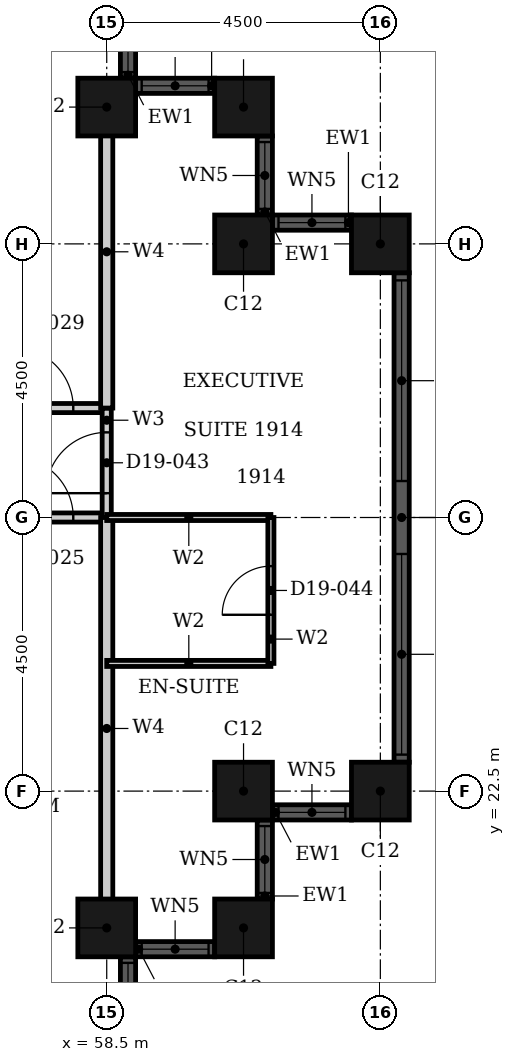
"""IFC4 building model, lengths in metres.
Left out: names, types, materials, properties, quantities, classifications, styles, units other than length and angle.
Written with IfcOpenShell. Run it as: python <this file> out.ifc"""

import sys

from ifc_helpers import new_model, si_unit, direction, frame, frame_2d, origin, origin_2d, place, context, subcontext, project, spatial, rectangle, hollow_rectangle, extrude, element, fill, save


model = new_model("IFC4")
c1 = context("Model", 3, precision=1e-05, world=origin(), true_north=direction((0.0, 1.0)))
c2 = subcontext(c1, "Body", "Model", "MODEL_VIEW")
j1 = project(units=[si_unit("LENGTHUNIT", "METRE"), si_unit("PLANEANGLEUNIT", "RADIAN")], contexts=[c1])
p1 = place(None, origin())
s1 = spatial("IfcSite", under=j1, at=p1, CompositionType="ELEMENT")
p2 = place(p1, origin())
s2 = spatial("IfcBuilding", under=s1, at=p2, CompositionType="ELEMENT")
p3 = place(p2, frame((0.0, 0.0, 81.6)))
s3 = spatial("IfcBuildingStorey", under=s2, at=p3, CompositionType="ELEMENT", Elevation=81.6)
for number, where, z_axis, x_axis in (
    (1, (58.5, 20.25, 0.0), (0.0, 0.0, 1.0), (1.0, 0.0, 0.0)),
    (2, (60.75, 20.25, 0.0), (0.0, 0.0, 1.0), (1.0, 0.0, 0.0)),
    (3, (60.75, 22.5, 0.0), (0.0, 0.0, 1.0), (1.0, 0.0, 0.0)),
    (4, (63.0, 22.5, 0.0), (0.0, 0.0, 1.0), (1.0, 0.0, 0.0)),
    (5, (63.0, 31.5, 0.0), (0.0, 0.0, 1.0), (1.0, 0.0, 0.0)),
    (6, (60.75, 31.5, 0.0), (0.0, 0.0, 1.0), (1.0, 0.0, 0.0)),
    (7, (60.75, 33.75, 0.0), (0.0, 0.0, 1.0), (1.0, 0.0, 0.0)),
    (8, (58.5, 33.75, 0.0), (0.0, 0.0, 1.0), (1.0, 0.0, 0.0)),
):
    element("IfcColumn", number, at=place(p3, frame(where, z_axis=z_axis, x_axis=x_axis)), inside=s3, PredefinedType="COLUMN", context=c2, shape_type="SweptSolid", body=[
        extrude(hollow_rectangle(XDim=0.95, YDim=0.95, WallThickness=0.03, at=origin_2d()), origin(), (0.0, 0.0, 1.0), 3.6),
    ])
p4 = place(p3, frame((58.85, 18.475, 0.0), z_axis=(0.0, 0.0, 1.0), x_axis=(0.0, 1.0, 0.0)))
e9 = element("IfcWall", 9, at=p4, inside=s3, PredefinedType="SOLIDWALL", context=c2, shape_type="SweptSolid", body=[
    extrude(rectangle(XDim=1.3, YDim=0.25, at=frame_2d((0.65, 0.0))), origin(), (0.0, 0.0, 1.0), 3.6),
])
p5 = place(p4, frame((0.1, 0.0, 0.9)))
e10 = element("IfcOpeningElement", 10, at=p5, cuts=e9, PredefinedType="OPENING", context=c2, shape_type="SweptSolid", body=[
    extrude(rectangle(XDim=1.1, YDim=2.08, at=frame_2d((0.55, 1.04))), frame((0.0, 0.135, 0.0), z_axis=(0.0, -1.0, 0.0), x_axis=(1.0, 0.0, 0.0)), (0.0, 0.0, 1.0), 0.27),
])
p6 = place(p3, frame((58.975, 19.9, 0.0), z_axis=(0.0, 0.0, 1.0), x_axis=(1.0, 0.0, 0.0)))
e11 = element("IfcWall", 11, at=p6, inside=s3, PredefinedType="SOLIDWALL", context=c2, shape_type="SweptSolid", body=[
    extrude(rectangle(XDim=1.3, YDim=0.25, at=frame_2d((0.65, 0.0))), origin(), (0.0, 0.0, 1.0), 3.6),
])
p7 = place(p6, frame((0.1, 0.0, 0.9)))
e12 = element("IfcOpeningElement", 12, at=p7, cuts=e11, PredefinedType="OPENING", context=c2, shape_type="SweptSolid", body=[
    extrude(rectangle(XDim=1.1, YDim=2.08, at=frame_2d((0.55, 1.04))), frame((0.0, 0.135, 0.0), z_axis=(0.0, -1.0, 0.0), x_axis=(1.0, 0.0, 0.0)), (0.0, 0.0, 1.0), 0.27),
])
p8 = place(p3, frame((61.1, 20.725, 0.0), z_axis=(0.0, 0.0, 1.0), x_axis=(0.0, 1.0, 0.0)))
e13 = element("IfcWall", 13, at=p8, inside=s3, PredefinedType="SOLIDWALL", context=c2, shape_type="SweptSolid", body=[
    extrude(rectangle(XDim=1.3, YDim=0.25, at=frame_2d((0.65, 0.0))), origin(), (0.0, 0.0, 1.0), 3.6),
])
p9 = place(p8, frame((0.1, 0.0, 0.9)))
e14 = element("IfcOpeningElement", 14, at=p9, cuts=e13, PredefinedType="OPENING", context=c2, shape_type="SweptSolid", body=[
    extrude(rectangle(XDim=1.1, YDim=2.08, at=frame_2d((0.55, 1.04))), frame((0.0, 0.135, 0.0), z_axis=(0.0, -1.0, 0.0), x_axis=(1.0, 0.0, 0.0)), (0.0, 0.0, 1.0), 0.27),
])
p10 = place(p3, frame((61.225, 22.15, 0.0), z_axis=(0.0, 0.0, 1.0), x_axis=(1.0, 0.0, 0.0)))
e15 = element("IfcWall", 15, at=p10, inside=s3, PredefinedType="SOLIDWALL", context=c2, shape_type="SweptSolid", body=[
    extrude(rectangle(XDim=1.3, YDim=0.25, at=frame_2d((0.65, 0.0))), origin(), (0.0, 0.0, 1.0), 3.6),
])
p11 = place(p10, frame((0.1, 0.0, 0.9)))
e16 = element("IfcOpeningElement", 16, at=p11, cuts=e15, PredefinedType="OPENING", context=c2, shape_type="SweptSolid", body=[
    extrude(rectangle(XDim=1.1, YDim=2.08, at=frame_2d((0.55, 1.04))), frame((0.0, 0.135, 0.0), z_axis=(0.0, -1.0, 0.0), x_axis=(1.0, 0.0, 0.0)), (0.0, 0.0, 1.0), 0.27),
])
p12 = place(p3, frame((63.35, 22.975, 0.0), z_axis=(0.0, 0.0, 1.0), x_axis=(0.0, 1.0, 0.0)))
e17 = element("IfcWall", 17, at=p12, inside=s3, PredefinedType="SOLIDWALL", context=c2, shape_type="SweptSolid", body=[
    extrude(rectangle(XDim=8.05, YDim=0.25, at=frame_2d((4.025, 0.0))), origin(), (0.0, 0.0, 1.0), 3.6),
])
p13 = place(p12, frame((0.125, 0.0, 0.9)))
e18 = element("IfcOpeningElement", 18, at=p13, cuts=e17, PredefinedType="OPENING", context=c2, shape_type="SweptSolid", body=[
    extrude(rectangle(XDim=3.3, YDim=2.08, at=frame_2d((1.65, 1.04))), frame((0.0, 0.135, 0.0), z_axis=(0.0, -1.0, 0.0), x_axis=(1.0, 0.0, 0.0)), (0.0, 0.0, 1.0), 0.27),
])
p14 = place(p12, frame((4.625, 0.0, 0.9)))
e19 = element("IfcOpeningElement", 19, at=p14, cuts=e17, PredefinedType="OPENING", context=c2, shape_type="SweptSolid", body=[
    extrude(rectangle(XDim=3.3, YDim=2.08, at=frame_2d((1.65, 1.04))), frame((0.0, 0.135, 0.0), z_axis=(0.0, -1.0, 0.0), x_axis=(1.0, 0.0, 0.0)), (0.0, 0.0, 1.0), 0.27),
])
p15 = place(p3, frame((62.525, 31.85, 0.0), z_axis=(0.0, 0.0, 1.0), x_axis=(-1.0, 0.0, 0.0)))
e20 = element("IfcWall", 20, at=p15, inside=s3, PredefinedType="SOLIDWALL", context=c2, shape_type="SweptSolid", body=[
    extrude(rectangle(XDim=1.3, YDim=0.25, at=frame_2d((0.65, 0.0))), origin(), (0.0, 0.0, 1.0), 3.6),
])
p16 = place(p15, frame((0.1, 0.0, 0.9)))
e21 = element("IfcOpeningElement", 21, at=p16, cuts=e20, PredefinedType="OPENING", context=c2, shape_type="SweptSolid", body=[
    extrude(rectangle(XDim=1.1, YDim=2.08, at=frame_2d((0.55, 1.04))), frame((0.0, 0.135, 0.0), z_axis=(0.0, -1.0, 0.0), x_axis=(1.0, 0.0, 0.0)), (0.0, 0.0, 1.0), 0.27),
])
p17 = place(p3, frame((61.1, 31.975, 0.0), z_axis=(0.0, 0.0, 1.0), x_axis=(0.0, 1.0, 0.0)))
e22 = element("IfcWall", 22, at=p17, inside=s3, PredefinedType="SOLIDWALL", context=c2, shape_type="SweptSolid", body=[
    extrude(rectangle(XDim=1.3, YDim=0.25, at=frame_2d((0.65, 0.0))), origin(), (0.0, 0.0, 1.0), 3.6),
])
p18 = place(p17, frame((0.1, 0.0, 0.9)))
e23 = element("IfcOpeningElement", 23, at=p18, cuts=e22, PredefinedType="OPENING", context=c2, shape_type="SweptSolid", body=[
    extrude(rectangle(XDim=1.1, YDim=2.08, at=frame_2d((0.55, 1.04))), frame((0.0, 0.135, 0.0), z_axis=(0.0, -1.0, 0.0), x_axis=(1.0, 0.0, 0.0)), (0.0, 0.0, 1.0), 0.27),
])
p19 = place(p3, frame((60.275, 34.1, 0.0), z_axis=(0.0, 0.0, 1.0), x_axis=(-1.0, 0.0, 0.0)))
e24 = element("IfcWall", 24, at=p19, inside=s3, PredefinedType="SOLIDWALL", context=c2, shape_type="SweptSolid", body=[
    extrude(rectangle(XDim=1.3, YDim=0.25, at=frame_2d((0.65, 0.0))), origin(), (0.0, 0.0, 1.0), 3.6),
])
p20 = place(p19, frame((0.1, 0.0, 0.9)))
e25 = element("IfcOpeningElement", 25, at=p20, cuts=e24, PredefinedType="OPENING", context=c2, shape_type="SweptSolid", body=[
    extrude(rectangle(XDim=1.1, YDim=2.08, at=frame_2d((0.55, 1.04))), frame((0.0, 0.135, 0.0), z_axis=(0.0, -1.0, 0.0), x_axis=(1.0, 0.0, 0.0)), (0.0, 0.0, 1.0), 0.27),
])
p21 = place(p3, frame((58.85, 34.225, 0.0), z_axis=(0.0, 0.0, 1.0), x_axis=(0.0, 1.0, 0.0)))
e26 = element("IfcWall", 26, at=p21, inside=s3, PredefinedType="SOLIDWALL", context=c2, shape_type="SweptSolid", body=[
    extrude(rectangle(XDim=1.3, YDim=0.25, at=frame_2d((0.65, 0.0))), origin(), (0.0, 0.0, 1.0), 3.6),
])
p22 = place(p21, frame((0.1, 0.0, 0.9)))
e27 = element("IfcOpeningElement", 27, at=p22, cuts=e26, PredefinedType="OPENING", context=c2, shape_type="SweptSolid", body=[
    extrude(rectangle(XDim=1.1, YDim=2.08, at=frame_2d((0.55, 1.04))), frame((0.0, 0.135, 0.0), z_axis=(0.0, -1.0, 0.0), x_axis=(1.0, 0.0, 0.0)), (0.0, 0.0, 1.0), 0.27),
])
p23 = place(p3, frame((46.8, 27.0, 0.0), z_axis=(0.0, 0.0, 1.0), x_axis=(1.0, 0.0, 0.0)))
e28 = element("IfcWall", 28, at=p23, inside=s3, PredefinedType="PARTITIONING", context=c2, shape_type="SweptSolid", body=[
    extrude(rectangle(XDim=11.7, YDim=0.15, at=frame_2d((5.85, 0.0))), origin(), (0.0, 0.0, 1.0), 2.58),
])
p24 = place(p23, frame((5.65, 0.0, 0.0)))
e29 = element("IfcOpeningElement", 29, at=p24, cuts=e28, PredefinedType="OPENING", context=c2, shape_type="SweptSolid", body=[
    extrude(rectangle(XDim=1.0, YDim=2.1, at=frame_2d((0.5, 1.05))), frame((0.0, 0.085, 0.0), z_axis=(0.0, -1.0, 0.0), x_axis=(1.0, 0.0, 0.0)), (0.0, 0.0, 1.0), 0.17),
])
p25 = place(p23, frame((10.15, 0.0, 0.0)))
e30 = element("IfcOpeningElement", 30, at=p25, cuts=e28, PredefinedType="OPENING", context=c2, shape_type="SweptSolid", body=[
    extrude(rectangle(XDim=1.0, YDim=2.1, at=frame_2d((0.5, 1.05))), frame((0.0, 0.085, 0.0), z_axis=(0.0, -1.0, 0.0), x_axis=(1.0, 0.0, 0.0)), (0.0, 0.0, 1.0), 0.17),
])
p26 = place(p3, frame((46.8, 28.8, 0.0), z_axis=(0.0, 0.0, 1.0), x_axis=(1.0, 0.0, 0.0)))
e31 = element("IfcWall", 31, at=p26, inside=s3, PredefinedType="PARTITIONING", context=c2, shape_type="SweptSolid", body=[
    extrude(rectangle(XDim=11.7, YDim=0.15, at=frame_2d((5.85, 0.0))), origin(), (0.0, 0.0, 1.0), 3.3),
])
p27 = place(p26, frame((5.65, 0.0, 0.0)))
e32 = element("IfcOpeningElement", 32, at=p27, cuts=e31, PredefinedType="OPENING", context=c2, shape_type="SweptSolid", body=[
    extrude(rectangle(XDim=1.0, YDim=2.1, at=frame_2d((0.5, 1.05))), frame((0.0, 0.085, 0.0), z_axis=(0.0, -1.0, 0.0), x_axis=(1.0, 0.0, 0.0)), (0.0, 0.0, 1.0), 0.17),
])
p28 = place(p26, frame((10.15, 0.0, 0.0)))
e33 = element("IfcOpeningElement", 33, at=p28, cuts=e31, PredefinedType="OPENING", context=c2, shape_type="SweptSolid", body=[
    extrude(rectangle(XDim=1.0, YDim=2.1, at=frame_2d((0.5, 1.05))), frame((0.0, 0.085, 0.0), z_axis=(0.0, -1.0, 0.0), x_axis=(1.0, 0.0, 0.0)), (0.0, 0.0, 1.0), 0.17),
])
p29 = place(p3, frame((58.5, 27.0, 0.0), z_axis=(0.0, 0.0, 1.0), x_axis=(0.0, 1.0, 0.0)))
e34 = element("IfcWall", 34, at=p29, inside=s3, PredefinedType="PARTITIONING", context=c2, shape_type="SweptSolid", body=[
    extrude(rectangle(XDim=1.8, YDim=0.15, at=frame_2d((0.9, 0.0))), origin(), (0.0, 0.0, 1.0), 3.3),
])
p30 = place(p29, frame((0.4, 0.0, 0.0)))
e35 = element("IfcOpeningElement", 35, at=p30, cuts=e34, PredefinedType="OPENING", context=c2, shape_type="SweptSolid", body=[
    extrude(rectangle(XDim=1.0, YDim=2.1, at=frame_2d((0.5, 1.05))), frame((0.0, 0.085, 0.0), z_axis=(0.0, -1.0, 0.0), x_axis=(1.0, 0.0, 0.0)), (0.0, 0.0, 1.0), 0.17),
])
p31 = place(p3, frame((58.5, 28.8, 0.0), z_axis=(0.0, 0.0, 1.0), x_axis=(0.0, 1.0, 0.0)))
e36 = element("IfcWall", 36, at=p31, inside=s3, PredefinedType="PARTITIONING", context=c2, shape_type="SweptSolid", body=[
    extrude(rectangle(XDim=5.14, YDim=0.2, at=frame_2d((2.57, 0.0))), origin(), (0.0, 0.0, 1.0), 3.3),
])
p32 = place(p3, frame((58.5, 20.06, 0.0), z_axis=(0.0, 0.0, 1.0), x_axis=(0.0, 1.0, 0.0)))
e37 = element("IfcWall", 37, at=p32, inside=s3, PredefinedType="PARTITIONING", context=c2, shape_type="SweptSolid", body=[
    extrude(rectangle(XDim=6.94, YDim=0.2, at=frame_2d((3.47, 0.0))), origin(), (0.0, 0.0, 1.0), 3.3),
])
p33 = place(p3, frame((58.5, 24.6, 0.0), z_axis=(0.0, 0.0, 1.0), x_axis=(1.0, 0.0, 0.0)))
e38 = element("IfcWall", 38, at=p33, inside=s3, PredefinedType="PARTITIONING", context=c2, shape_type="SweptSolid", body=[
    extrude(rectangle(XDim=2.7, YDim=0.1, at=frame_2d((1.35, 0.0))), origin(), (0.0, 0.0, 1.0), 3.3),
])
p34 = place(p3, frame((58.5, 27.0, 0.0), z_axis=(0.0, 0.0, 1.0), x_axis=(1.0, 0.0, 0.0)))
e39 = element("IfcWall", 39, at=p34, inside=s3, PredefinedType="PARTITIONING", context=c2, shape_type="SweptSolid", body=[
    extrude(rectangle(XDim=2.7, YDim=0.1, at=frame_2d((1.35, 0.0))), origin(), (0.0, 0.0, 1.0), 2.58),
])
p35 = place(p3, frame((61.2, 24.6, 0.0), z_axis=(0.0, 0.0, 1.0), x_axis=(0.0, 1.0, 0.0)))
e40 = element("IfcWall", 40, at=p35, inside=s3, PredefinedType="PARTITIONING", context=c2, shape_type="SweptSolid", body=[
    extrude(rectangle(XDim=2.4, YDim=0.1, at=frame_2d((1.2, 0.0))), origin(), (0.0, 0.0, 1.0), 3.3),
])
p36 = place(p35, frame((0.8, 0.0, 0.0)))
e41 = element("IfcOpeningElement", 41, at=p36, cuts=e40, PredefinedType="OPENING", context=c2, shape_type="SweptSolid", body=[
    extrude(rectangle(XDim=0.8, YDim=2.1, at=frame_2d((0.4, 1.05))), frame((0.0, 0.06, 0.0), z_axis=(0.0, -1.0, 0.0), x_axis=(1.0, 0.0, 0.0)), (0.0, 0.0, 1.0), 0.12),
])
p37 = place(p5, origin())
e42 = element("IfcWindow", 42, at=p37, inside=s3, PartitioningType="SINGLE_PANEL", PredefinedType="WINDOW", context=c2, shape_type="SweptSolid", body=[
    extrude(rectangle(XDim=1.1, YDim=2.08, at=frame_2d((0.55, 1.04))), frame((0.0, 0.03, 0.0), z_axis=(0.0, -1.0, 0.0), x_axis=(1.0, 0.0, 0.0)), (0.0, 0.0, 1.0), 0.06),
])
fill(e10, e42)
p38 = place(p7, origin())
e43 = element("IfcWindow", 43, at=p38, inside=s3, PartitioningType="SINGLE_PANEL", PredefinedType="WINDOW", context=c2, shape_type="SweptSolid", body=[
    extrude(rectangle(XDim=1.1, YDim=2.08, at=frame_2d((0.55, 1.04))), frame((0.0, 0.03, 0.0), z_axis=(0.0, -1.0, 0.0), x_axis=(1.0, 0.0, 0.0)), (0.0, 0.0, 1.0), 0.06),
])
fill(e12, e43)
p39 = place(p9, origin())
e44 = element("IfcWindow", 44, at=p39, inside=s3, PartitioningType="SINGLE_PANEL", PredefinedType="WINDOW", context=c2, shape_type="SweptSolid", body=[
    extrude(rectangle(XDim=1.1, YDim=2.08, at=frame_2d((0.55, 1.04))), frame((0.0, 0.03, 0.0), z_axis=(0.0, -1.0, 0.0), x_axis=(1.0, 0.0, 0.0)), (0.0, 0.0, 1.0), 0.06),
])
fill(e14, e44)
p40 = place(p11, origin())
e45 = element("IfcWindow", 45, at=p40, inside=s3, PartitioningType="SINGLE_PANEL", PredefinedType="WINDOW", context=c2, shape_type="SweptSolid", body=[
    extrude(rectangle(XDim=1.1, YDim=2.08, at=frame_2d((0.55, 1.04))), frame((0.0, 0.03, 0.0), z_axis=(0.0, -1.0, 0.0), x_axis=(1.0, 0.0, 0.0)), (0.0, 0.0, 1.0), 0.06),
])
fill(e16, e45)
p41 = place(p13, origin())
e46 = element("IfcWindow", 46, at=p41, inside=s3, PartitioningType="SINGLE_PANEL", PredefinedType="WINDOW", context=c2, shape_type="SweptSolid", body=[
    extrude(rectangle(XDim=3.3, YDim=2.08, at=frame_2d((1.65, 1.04))), frame((0.0, 0.03, 0.0), z_axis=(0.0, -1.0, 0.0), x_axis=(1.0, 0.0, 0.0)), (0.0, 0.0, 1.0), 0.06),
])
fill(e18, e46)
p42 = place(p14, origin())
e47 = element("IfcWindow", 47, at=p42, inside=s3, PartitioningType="SINGLE_PANEL", PredefinedType="WINDOW", context=c2, shape_type="SweptSolid", body=[
    extrude(rectangle(XDim=3.3, YDim=2.08, at=frame_2d((1.65, 1.04))), frame((0.0, 0.03, 0.0), z_axis=(0.0, -1.0, 0.0), x_axis=(1.0, 0.0, 0.0)), (0.0, 0.0, 1.0), 0.06),
])
fill(e19, e47)
p43 = place(p16, origin())
e48 = element("IfcWindow", 48, at=p43, inside=s3, PartitioningType="SINGLE_PANEL", PredefinedType="WINDOW", context=c2, shape_type="SweptSolid", body=[
    extrude(rectangle(XDim=1.1, YDim=2.08, at=frame_2d((0.55, 1.04))), frame((0.0, 0.03, 0.0), z_axis=(0.0, -1.0, 0.0), x_axis=(1.0, 0.0, 0.0)), (0.0, 0.0, 1.0), 0.06),
])
fill(e21, e48)
p44 = place(p18, origin())
e49 = element("IfcWindow", 49, at=p44, inside=s3, PartitioningType="SINGLE_PANEL", PredefinedType="WINDOW", context=c2, shape_type="SweptSolid", body=[
    extrude(rectangle(XDim=1.1, YDim=2.08, at=frame_2d((0.55, 1.04))), frame((0.0, 0.03, 0.0), z_axis=(0.0, -1.0, 0.0), x_axis=(1.0, 0.0, 0.0)), (0.0, 0.0, 1.0), 0.06),
])
fill(e23, e49)
p45 = place(p20, origin())
e50 = element("IfcWindow", 50, at=p45, inside=s3, PartitioningType="SINGLE_PANEL", PredefinedType="WINDOW", context=c2, shape_type="SweptSolid", body=[
    extrude(rectangle(XDim=1.1, YDim=2.08, at=frame_2d((0.55, 1.04))), frame((0.0, 0.03, 0.0), z_axis=(0.0, -1.0, 0.0), x_axis=(1.0, 0.0, 0.0)), (0.0, 0.0, 1.0), 0.06),
])
fill(e25, e50)
p46 = place(p22, origin())
e51 = element("IfcWindow", 51, at=p46, inside=s3, PartitioningType="SINGLE_PANEL", PredefinedType="WINDOW", context=c2, shape_type="SweptSolid", body=[
    extrude(rectangle(XDim=1.1, YDim=2.08, at=frame_2d((0.55, 1.04))), frame((0.0, 0.03, 0.0), z_axis=(0.0, -1.0, 0.0), x_axis=(1.0, 0.0, 0.0)), (0.0, 0.0, 1.0), 0.06),
])
fill(e27, e51)
p47 = place(p25, origin())
e52 = element("IfcDoor", 52, at=p47, inside=s3, OperationType="SINGLE_SWING_RIGHT", PredefinedType="DOOR", context=c2, shape_type="SweptSolid", body=[
    extrude(rectangle(XDim=1.0, YDim=2.1, at=frame_2d((0.5, 1.05))), frame((0.0, 0.025, 0.0), z_axis=(0.0, -1.0, 0.0), x_axis=(1.0, 0.0, 0.0)), (0.0, 0.0, 1.0), 0.05),
])
fill(e30, e52)
p48 = place(p28, origin())
e53 = element("IfcDoor", 53, at=p48, inside=s3, OperationType="SINGLE_SWING_RIGHT", PredefinedType="DOOR", context=c2, shape_type="SweptSolid", body=[
    extrude(rectangle(XDim=1.0, YDim=2.1, at=frame_2d((0.5, 1.05))), frame((0.0, 0.025, 0.0), z_axis=(0.0, -1.0, 0.0), x_axis=(1.0, 0.0, 0.0)), (0.0, 0.0, 1.0), 0.05),
])
fill(e33, e53)
p49 = place(p30, origin())
e54 = element("IfcDoor", 54, at=p49, inside=s3, OperationType="SINGLE_SWING_RIGHT", PredefinedType="DOOR", context=c2, shape_type="SweptSolid", body=[
    extrude(rectangle(XDim=1.0, YDim=2.1, at=frame_2d((0.5, 1.05))), frame((0.0, 0.025, 0.0), z_axis=(0.0, -1.0, 0.0), x_axis=(1.0, 0.0, 0.0)), (0.0, 0.0, 1.0), 0.05),
])
fill(e35, e54)
p50 = place(p36, origin())
e55 = element("IfcDoor", 55, at=p50, inside=s3, OperationType="SINGLE_SWING_RIGHT", PredefinedType="DOOR", context=c2, shape_type="SweptSolid", body=[
    extrude(rectangle(XDim=0.8, YDim=2.1, at=frame_2d((0.4, 1.05))), frame((0.0, 0.025, 0.0), z_axis=(0.0, -1.0, 0.0), x_axis=(1.0, 0.0, 0.0)), (0.0, 0.0, 1.0), 0.05),
])
fill(e41, e55)
save(model, sys.argv[1])
